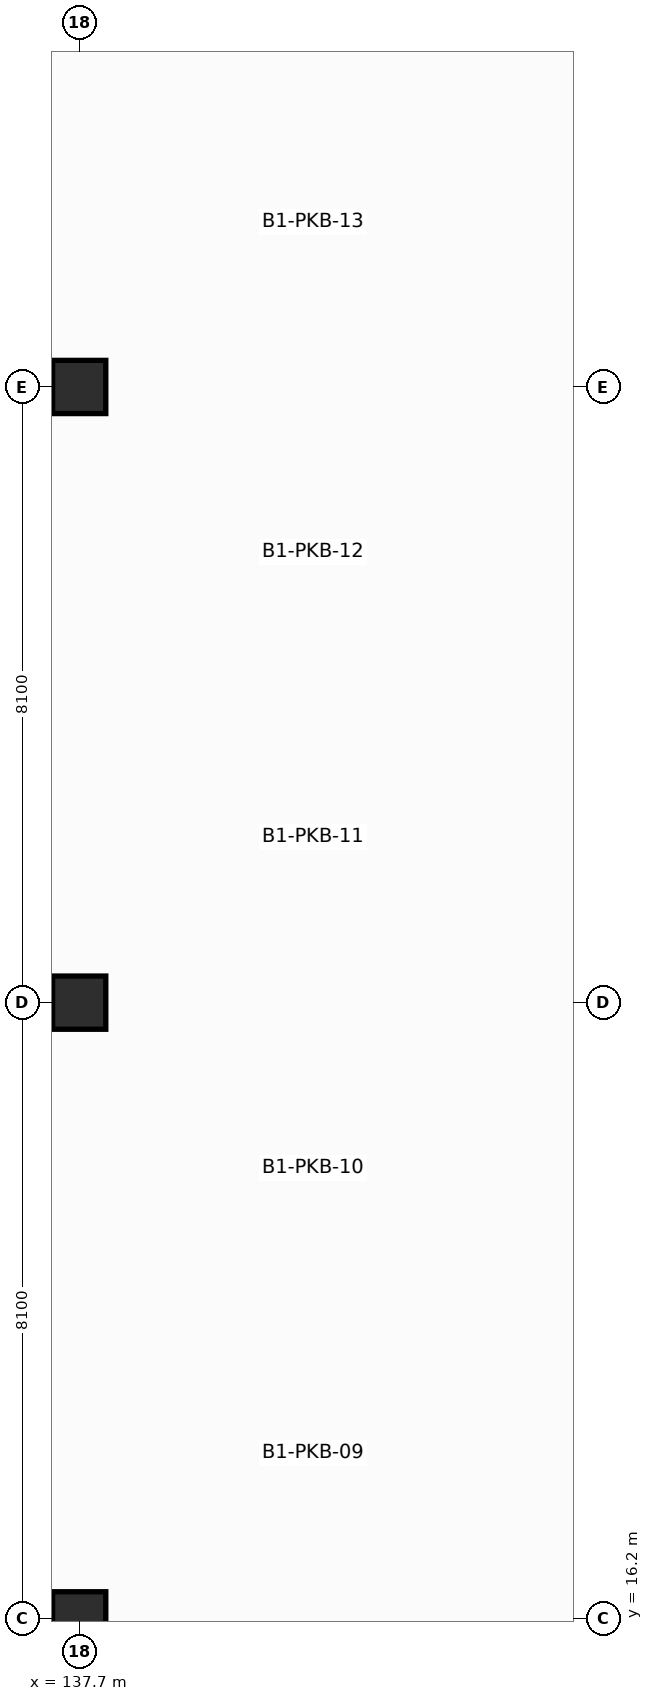
"""IFC4 building model, lengths in metres.
Left out: names, types, materials, properties, quantities, classifications, styles, units other than length and angle.
Written with IfcOpenShell. Run it as: python <this file> out.ifc"""

import sys

from ifc_helpers import new_model, si_unit, direction, frame, origin, origin_2d, place, context, subcontext, project, spatial, rectangle, extrude, element, save


model = new_model("IFC4")
c1 = context("Model", 3, precision=1e-05, world=origin(), true_north=direction((0.0, 1.0)))
c2 = subcontext(c1, "Body", "Model", "MODEL_VIEW")
j1 = project(units=[si_unit("LENGTHUNIT", "METRE"), si_unit("PLANEANGLEUNIT", "RADIAN")], contexts=[c1])
p1 = place(None, origin())
s1 = spatial("IfcSite", under=j1, at=p1, CompositionType="ELEMENT")
p2 = place(p1, origin())
s2 = spatial("IfcBuilding", under=s1, at=p2, CompositionType="ELEMENT")
p3 = place(p2, frame((0.0, 0.0, -5.4)))
s3 = spatial("IfcBuildingStorey", under=s2, at=p3, CompositionType="ELEMENT", Elevation=-5.4)
for number, where, z_axis, x_axis in (
    (1, (137.7, 16.2, -0.4), (0.0, 0.0, 1.0), (1.0, 0.0, 0.0)),
    (2, (137.7, 24.3, -0.4), (0.0, 0.0, 1.0), (1.0, 0.0, 0.0)),
    (3, (137.7, 32.4, -0.4), (0.0, 0.0, 1.0), (1.0, 0.0, 0.0)),
):
    element("IfcColumn", number, at=place(p3, frame(where, z_axis=z_axis, x_axis=x_axis)), inside=s3, PredefinedType="COLUMN", context=c2, shape_type="SweptSolid", body=[
        extrude(rectangle(XDim=0.7, YDim=0.7, at=origin_2d()), origin(), (0.0, 0.0, 1.0), 5.8),
    ])
save(model, sys.argv[1])
